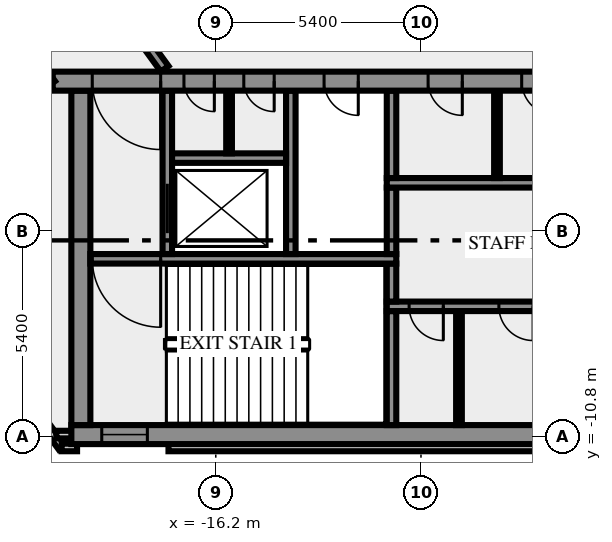
"""IFC4 building model, lengths in metres.
Left out: names, types, materials, properties, quantities, classifications, styles, units other than length and angle.
Written with IfcOpenShell. Run it as: python <this file> out.ifc"""

import sys

from ifc_helpers import new_model, si_unit, direction, frame, frame_2d, origin, place, context, subcontext, project, spatial, rectangle, extrude, element, fill, save


model = new_model("IFC4")
c1 = context("Model", 3, precision=1e-05, world=origin(), true_north=direction((0.0, 1.0)))
c2 = subcontext(c1, "Body", "Model", "MODEL_VIEW")
j1 = project(units=[si_unit("LENGTHUNIT", "METRE"), si_unit("PLANEANGLEUNIT", "RADIAN")], contexts=[c1])
p1 = place(None, origin())
s1 = spatial("IfcSite", under=j1, at=p1, CompositionType="ELEMENT")
p2 = place(p1, origin())
s2 = spatial("IfcBuilding", under=s1, at=p2, CompositionType="ELEMENT")
p3 = place(p2, frame((0.0, 0.0, 222.0)))
s3 = spatial("IfcBuildingStorey", under=s2, at=p3, CompositionType="ELEMENT", Elevation=222.0)
p4 = place(p3, frame((-21.833, -8.909, 0.0), z_axis=(0.0, 0.0, 1.0), x_axis=(0.587766567315, -0.809030569476, 0.0)))
e1 = element("IfcWall", 1, at=p4, inside=s3, PredefinedType="SOLIDWALL", context=c2, shape_type="SweptSolid", body=[
    extrude(rectangle(XDim=2.688, YDim=0.2, at=frame_2d((1.344, 0.0))), origin(), (0.0, 0.0, 1.0), 3.65),
])
p5 = place(p3, frame((-20.256, -11.088, 0.0), z_axis=(0.0, 0.0, 1.0), x_axis=(1.0, 0.0, 0.0)))
e2 = element("IfcWall", 2, at=p5, inside=s3, PredefinedType="SOLIDWALL", context=c2, shape_type="SweptSolid", body=[
    extrude(rectangle(XDim=0.406, YDim=0.2, at=frame_2d((0.203, 0.0))), origin(), (0.0, 0.0, 1.0), 3.65),
])
p6 = place(p3, frame((-17.444, -11.088, 0.0), z_axis=(0.0, 0.0, 1.0), x_axis=(1.0, 0.0, 0.0)))
e3 = element("IfcWall", 3, at=p6, inside=s3, PredefinedType="SOLIDWALL", context=c2, shape_type="SweptSolid", body=[
    extrude(rectangle(XDim=34.888, YDim=0.2, at=frame_2d((17.444, 0.0))), origin(), (0.0, 0.0, 1.0), 3.65),
])
p7 = place(p3, frame((-19.98, -10.75, 0.0), z_axis=(0.0, 0.0, 1.0), x_axis=(-1.0, 0.0, 0.0)))
e4 = element("IfcWall", 4, at=p7, inside=s3, PredefinedType="SOLIDWALL", context=c2, shape_type="SweptSolid", body=[
    extrude(rectangle(XDim=0.417, YDim=0.2, at=frame_2d((0.208, 0.0))), origin(), (0.0, 0.0, 1.0), 3.65),
])
p8 = place(p3, frame((-20.0, -10.75, 0.0), z_axis=(0.0, 0.0, 1.0), x_axis=(1.0, 0.0, 0.0)))
e5 = element("IfcWall", 5, at=p8, inside=s3, PredefinedType="SHEAR", context=c2, shape_type="SweptSolid", body=[
    extrude(rectangle(XDim=40.0, YDim=0.5, at=frame_2d((20.0, 0.0))), origin(), (0.0, 0.0, 1.0), 3.65),
])
p9 = place(p8, frame((0.8, 0.0, 1.0)))
e6 = element("IfcOpeningElement", 6, at=p9, cuts=e5, PredefinedType="OPENING", context=c2, shape_type="SweptSolid", body=[
    extrude(rectangle(XDim=1.2, YDim=1.2, at=frame_2d((0.6, 0.6))), frame((0.0, 0.26, 0.0), z_axis=(0.0, -1.0, 0.0), x_axis=(1.0, 0.0, 0.0)), (0.0, 0.0, 1.0), 0.52),
])
p10 = place(p8, frame((38.0, 0.0, 1.0)))
e7 = element("IfcOpeningElement", 7, at=p10, cuts=e5, PredefinedType="OPENING", context=c2, shape_type="SweptSolid", body=[
    extrude(rectangle(XDim=1.2, YDim=1.2, at=frame_2d((0.6, 0.6))), frame((0.0, 0.26, 0.0), z_axis=(0.0, -1.0, 0.0), x_axis=(1.0, 0.0, 0.0)), (0.0, 0.0, 1.0), 0.52),
])
p11 = place(p3, frame((-19.75, -10.5, 0.0), z_axis=(0.0, 0.0, 1.0), x_axis=(0.0, 1.0, 0.0)))
e8 = element("IfcWall", 8, at=p11, inside=s3, PredefinedType="SHEAR", context=c2, shape_type="SweptSolid", body=[
    extrude(rectangle(XDim=8.8, YDim=0.5, at=frame_2d((4.4, 0.0))), origin(), (0.0, 0.0, 1.0), 3.65),
])
p12 = place(p3, frame((-11.575, -10.5, 0.0), z_axis=(0.0, 0.0, 1.0), x_axis=(0.0, 1.0, 0.0)))
e9 = element("IfcWall", 9, at=p12, inside=s3, PredefinedType="SHEAR", context=c2, shape_type="SweptSolid", body=[
    extrude(rectangle(XDim=3.0, YDim=0.25, at=frame_2d((1.5, 0.0))), origin(), (0.0, 0.0, 1.0), 3.65),
])
p13 = place(p3, frame((-9.8, -10.5, 0.0), z_axis=(0.0, 0.0, 1.0), x_axis=(0.0, 1.0, 0.0)))
e10 = element("IfcWall", 10, at=p13, inside=s3, PredefinedType="PARTITIONING", context=c2, shape_type="SweptSolid", body=[
    extrude(rectangle(XDim=3.0, YDim=0.15, at=frame_2d((1.5, 0.0))), origin(), (0.0, 0.0, 1.0), 3.65),
])
p14 = place(p3, frame((11.7, -7.375, 0.0), z_axis=(0.0, 0.0, 1.0), x_axis=(-1.0, 0.0, 0.0)))
e11 = element("IfcWall", 11, at=p14, inside=s3, PredefinedType="SHEAR", context=c2, shape_type="SweptSolid", body=[
    extrude(rectangle(XDim=23.4, YDim=0.25, at=frame_2d((11.7, 0.0))), origin(), (0.0, 0.0, 1.0), 3.65),
])
p15 = place(p14, frame((21.912, 0.0, 0.0)))
e12 = element("IfcOpeningElement", 12, at=p15, cuts=e11, PredefinedType="OPENING", context=c2, shape_type="SweptSolid", body=[
    extrude(rectangle(XDim=0.9, YDim=2.1, at=frame_2d((0.45, 1.05))), frame((0.0, 0.135, 0.0), z_axis=(0.0, -1.0, 0.0), x_axis=(1.0, 0.0, 0.0)), (0.0, 0.0, 1.0), 0.27),
])
p16 = place(p14, frame((19.55, 0.0, 0.0)))
e13 = element("IfcOpeningElement", 13, at=p16, cuts=e11, PredefinedType="OPENING", context=c2, shape_type="SweptSolid", body=[
    extrude(rectangle(XDim=0.9, YDim=2.1, at=frame_2d((0.45, 1.05))), frame((0.0, 0.135, 0.0), z_axis=(0.0, -1.0, 0.0), x_axis=(1.0, 0.0, 0.0)), (0.0, 0.0, 1.0), 0.27),
])
p17 = place(p14, frame((16.688, 0.0, 0.0)))
e14 = element("IfcOpeningElement", 14, at=p17, cuts=e11, PredefinedType="OPENING", context=c2, shape_type="SweptSolid", body=[
    extrude(rectangle(XDim=0.9, YDim=2.1, at=frame_2d((0.45, 1.05))), frame((0.0, 0.135, 0.0), z_axis=(0.0, -1.0, 0.0), x_axis=(1.0, 0.0, 0.0)), (0.0, 0.0, 1.0), 0.27),
])
p18 = place(p14, frame((14.4, 0.0, 0.0)))
e15 = element("IfcOpeningElement", 15, at=p18, cuts=e11, PredefinedType="OPENING", context=c2, shape_type="SweptSolid", body=[
    extrude(rectangle(XDim=0.9, YDim=2.1, at=frame_2d((0.45, 1.05))), frame((0.0, 0.135, 0.0), z_axis=(0.0, -1.0, 0.0), x_axis=(1.0, 0.0, 0.0)), (0.0, 0.0, 1.0), 0.27),
])
p19 = place(p14, frame((12.5, 0.0, 0.0)))
e16 = element("IfcOpeningElement", 16, at=p19, cuts=e11, PredefinedType="OPENING", context=c2, shape_type="SweptSolid", body=[
    extrude(rectangle(XDim=0.9, YDim=2.1, at=frame_2d((0.45, 1.05))), frame((0.0, 0.135, 0.0), z_axis=(0.0, -1.0, 0.0), x_axis=(1.0, 0.0, 0.0)), (0.0, 0.0, 1.0), 0.27),
])
p20 = place(p14, frame((10.6, 0.0, 0.0)))
e17 = element("IfcOpeningElement", 17, at=p20, cuts=e11, PredefinedType="OPENING", context=c2, shape_type="SweptSolid", body=[
    extrude(rectangle(XDim=0.9, YDim=2.1, at=frame_2d((0.45, 1.05))), frame((0.0, 0.135, 0.0), z_axis=(0.0, -1.0, 0.0), x_axis=(1.0, 0.0, 0.0)), (0.0, 0.0, 1.0), 0.27),
])
p21 = place(p14, frame((8.35, 0.0, 0.0)))
e18 = element("IfcOpeningElement", 18, at=p21, cuts=e11, PredefinedType="OPENING", context=c2, shape_type="SweptSolid", body=[
    extrude(rectangle(XDim=1.1, YDim=2.1, at=frame_2d((0.55, 1.05))), frame((0.0, 0.135, 0.0), z_axis=(0.0, -1.0, 0.0), x_axis=(1.0, 0.0, 0.0)), (0.0, 0.0, 1.0), 0.27),
])
p22 = place(p14, frame((5.85, 0.0, 0.0)))
e19 = element("IfcOpeningElement", 19, at=p22, cuts=e11, PredefinedType="OPENING", context=c2, shape_type="SweptSolid", body=[
    extrude(rectangle(XDim=1.1, YDim=2.1, at=frame_2d((0.55, 1.05))), frame((0.0, 0.135, 0.0), z_axis=(0.0, -1.0, 0.0), x_axis=(1.0, 0.0, 0.0)), (0.0, 0.0, 1.0), 0.27),
])
p23 = place(p14, frame((3.35, 0.0, 0.0)))
e20 = element("IfcOpeningElement", 20, at=p23, cuts=e11, PredefinedType="OPENING", context=c2, shape_type="SweptSolid", body=[
    extrude(rectangle(XDim=1.1, YDim=2.1, at=frame_2d((0.55, 1.05))), frame((0.0, 0.135, 0.0), z_axis=(0.0, -1.0, 0.0), x_axis=(1.0, 0.0, 0.0)), (0.0, 0.0, 1.0), 0.27),
])
p24 = place(p14, frame((0.85, 0.0, 0.0)))
e21 = element("IfcOpeningElement", 21, at=p24, cuts=e11, PredefinedType="OPENING", context=c2, shape_type="SweptSolid", body=[
    extrude(rectangle(XDim=1.1, YDim=2.1, at=frame_2d((0.55, 1.05))), frame((0.0, 0.135, 0.0), z_axis=(0.0, -1.0, 0.0), x_axis=(1.0, 0.0, 0.0)), (0.0, 0.0, 1.0), 0.27),
])
p25 = place(p3, frame((-11.575, -7.25, 0.0), z_axis=(0.0, 0.0, 1.0), x_axis=(0.0, 1.0, 0.0)))
e22 = element("IfcWall", 22, at=p25, inside=s3, PredefinedType="SHEAR", context=c2, shape_type="SweptSolid", body=[
    extrude(rectangle(XDim=1.0, YDim=0.25, at=frame_2d((0.5, 0.0))), origin(), (0.0, 0.0, 1.0), 3.65),
])
p26 = place(p3, frame((-11.45, -6.125, 0.0), z_axis=(0.0, 0.0, 1.0), x_axis=(-1.0, 0.0, 0.0)))
e23 = element("IfcWall", 23, at=p26, inside=s3, PredefinedType="SHEAR", context=c2, shape_type="SweptSolid", body=[
    extrude(rectangle(XDim=8.05, YDim=0.25, at=frame_2d((4.025, 0.0))), origin(), (0.0, 0.0, 1.0), 3.65),
])
p27 = place(p26, frame((6.2, 0.0, 0.0)))
e24 = element("IfcOpeningElement", 24, at=p27, cuts=e23, PredefinedType="OPENING", context=c2, shape_type="SweptSolid", body=[
    extrude(rectangle(XDim=1.8, YDim=2.1, at=frame_2d((0.9, 1.05))), frame((0.0, 0.135, 0.0), z_axis=(0.0, -1.0, 0.0), x_axis=(1.0, 0.0, 0.0)), (0.0, 0.0, 1.0), 0.27),
])
p28 = place(p3, frame((-17.475, -6.0, 0.0), z_axis=(0.0, 0.0, 1.0), x_axis=(0.0, 1.0, 0.0)))
e25 = element("IfcWall", 25, at=p28, inside=s3, PredefinedType="SHEAR", context=c2, shape_type="SweptSolid", body=[
    extrude(rectangle(XDim=4.3, YDim=0.25, at=frame_2d((2.15, 0.0))), origin(), (0.0, 0.0, 1.0), 3.65),
])
p29 = place(p28, frame((0.55, 0.0, 0.0)))
e26 = element("IfcOpeningElement", 26, at=p29, cuts=e25, PredefinedType="OPENING", context=c2, shape_type="SweptSolid", body=[
    extrude(rectangle(XDim=1.3, YDim=2.1, at=frame_2d((0.65, 1.05))), frame((0.0, 0.135, 0.0), z_axis=(0.0, -1.0, 0.0), x_axis=(1.0, 0.0, 0.0)), (0.0, 0.0, 1.0), 0.27),
])
p30 = place(p3, frame((-14.225, -6.0, 0.0), z_axis=(0.0, 0.0, 1.0), x_axis=(0.0, 1.0, 0.0)))
e27 = element("IfcWall", 27, at=p30, inside=s3, PredefinedType="SHEAR", context=c2, shape_type="SweptSolid", body=[
    extrude(rectangle(XDim=4.3, YDim=0.25, at=frame_2d((2.15, 0.0))), origin(), (0.0, 0.0, 1.0), 3.65),
])
p31 = place(p3, frame((-11.575, -6.0, 0.0), z_axis=(0.0, 0.0, 1.0), x_axis=(0.0, 1.0, 0.0)))
e28 = element("IfcWall", 28, at=p31, inside=s3, PredefinedType="SHEAR", context=c2, shape_type="SweptSolid", body=[
    extrude(rectangle(XDim=1.75, YDim=0.25, at=frame_2d((0.875, 0.0))), origin(), (0.0, 0.0, 1.0), 3.65),
])
p32 = place(p3, frame((-11.7, -4.125, 0.0), z_axis=(0.0, 0.0, 1.0), x_axis=(1.0, 0.0, 0.0)))
e29 = element("IfcWall", 29, at=p32, inside=s3, PredefinedType="SHEAR", context=c2, shape_type="SweptSolid", body=[
    extrude(rectangle(XDim=7.75, YDim=0.25, at=frame_2d((3.875, 0.0))), origin(), (0.0, 0.0, 1.0), 3.65),
])
p33 = place(p3, frame((-11.575, -4.0, 0.0), z_axis=(0.0, 0.0, 1.0), x_axis=(0.0, 1.0, 0.0)))
e30 = element("IfcWall", 30, at=p33, inside=s3, PredefinedType="SHEAR", context=c2, shape_type="SweptSolid", body=[
    extrude(rectangle(XDim=2.3, YDim=0.25, at=frame_2d((1.15, 0.0))), origin(), (0.0, 0.0, 1.0), 3.65),
])
p34 = place(p3, frame((-8.8, -4.0, 0.0), z_axis=(0.0, 0.0, 1.0), x_axis=(0.0, 1.0, 0.0)))
e31 = element("IfcWall", 31, at=p34, inside=s3, PredefinedType="PARTITIONING", context=c2, shape_type="SweptSolid", body=[
    extrude(rectangle(XDim=2.3, YDim=0.15, at=frame_2d((1.15, 0.0))), origin(), (0.0, 0.0, 1.0), 3.65),
])
p35 = place(p3, frame((-17.35, -3.475, 0.0), z_axis=(0.0, 0.0, 1.0), x_axis=(1.0, 0.0, 0.0)))
e32 = element("IfcWall", 32, at=p35, inside=s3, PredefinedType="SHEAR", context=c2, shape_type="SweptSolid", body=[
    extrude(rectangle(XDim=3.0, YDim=0.25, at=frame_2d((1.5, 0.0))), origin(), (0.0, 0.0, 1.0), 3.65),
])
p36 = place(p3, frame((-15.85, -3.35, 0.0), z_axis=(0.0, 0.0, 1.0), x_axis=(0.0, 1.0, 0.0)))
e33 = element("IfcWall", 33, at=p36, inside=s3, PredefinedType="PARTITIONING", context=c2, shape_type="SweptSolid", body=[
    extrude(rectangle(XDim=1.65, YDim=0.15, at=frame_2d((0.825, 0.0))), origin(), (0.0, 0.0, 1.0), 3.65),
])
p37 = place(p3, frame((20.49, -1.45, 0.0), z_axis=(0.0, 0.0, 1.0), x_axis=(-1.0, 0.0, 0.0)))
e34 = element("IfcWall", 34, at=p37, inside=s3, PredefinedType="SHEAR", context=c2, shape_type="SweptSolid", body=[
    extrude(rectangle(XDim=40.98, YDim=0.5, at=frame_2d((20.49, 0.0))), origin(), (0.0, 0.0, 1.0), 3.65),
])
p38 = place(p37, frame((38.14, 0.0, 0.0)))
e35 = element("IfcOpeningElement", 35, at=p38, cuts=e34, PredefinedType="OPENING", context=c2, shape_type="SweptSolid", body=[
    extrude(rectangle(XDim=1.8, YDim=2.1, at=frame_2d((0.9, 1.05))), frame((0.0, 0.26, 0.0), z_axis=(0.0, -1.0, 0.0), x_axis=(1.0, 0.0, 0.0)), (0.0, 0.0, 1.0), 0.52),
])
p39 = place(p37, frame((36.728, 0.0, 0.0)))
e36 = element("IfcOpeningElement", 36, at=p39, cuts=e34, PredefinedType="OPENING", context=c2, shape_type="SweptSolid", body=[
    extrude(rectangle(XDim=0.8, YDim=2.1, at=frame_2d((0.4, 1.05))), frame((0.0, 0.26, 0.0), z_axis=(0.0, -1.0, 0.0), x_axis=(1.0, 0.0, 0.0)), (0.0, 0.0, 1.0), 0.52),
])
p40 = place(p37, frame((35.153, 0.0, 0.0)))
e37 = element("IfcOpeningElement", 37, at=p40, cuts=e34, PredefinedType="OPENING", context=c2, shape_type="SweptSolid", body=[
    extrude(rectangle(XDim=0.8, YDim=2.1, at=frame_2d((0.4, 1.05))), frame((0.0, 0.26, 0.0), z_axis=(0.0, -1.0, 0.0), x_axis=(1.0, 0.0, 0.0)), (0.0, 0.0, 1.0), 0.52),
])
p41 = place(p37, frame((32.94, 0.0, 0.0)))
e38 = element("IfcOpeningElement", 38, at=p41, cuts=e34, PredefinedType="OPENING", context=c2, shape_type="SweptSolid", body=[
    extrude(rectangle(XDim=0.9, YDim=2.1, at=frame_2d((0.45, 1.05))), frame((0.0, 0.26, 0.0), z_axis=(0.0, -1.0, 0.0), x_axis=(1.0, 0.0, 0.0)), (0.0, 0.0, 1.0), 0.52),
])
p42 = place(p37, frame((30.202, 0.0, 0.0)))
e39 = element("IfcOpeningElement", 39, at=p42, cuts=e34, PredefinedType="OPENING", context=c2, shape_type="SweptSolid", body=[
    extrude(rectangle(XDim=0.9, YDim=2.1, at=frame_2d((0.45, 1.05))), frame((0.0, 0.26, 0.0), z_axis=(0.0, -1.0, 0.0), x_axis=(1.0, 0.0, 0.0)), (0.0, 0.0, 1.0), 0.52),
])
p43 = place(p37, frame((27.74, 0.0, 0.0)))
e40 = element("IfcOpeningElement", 40, at=p43, cuts=e34, PredefinedType="OPENING", context=c2, shape_type="SweptSolid", body=[
    extrude(rectangle(XDim=0.9, YDim=2.1, at=frame_2d((0.45, 1.05))), frame((0.0, 0.26, 0.0), z_axis=(0.0, -1.0, 0.0), x_axis=(1.0, 0.0, 0.0)), (0.0, 0.0, 1.0), 0.52),
])
p44 = place(p37, frame((25.377, 0.0, 0.0)))
e41 = element("IfcOpeningElement", 41, at=p44, cuts=e34, PredefinedType="OPENING", context=c2, shape_type="SweptSolid", body=[
    extrude(rectangle(XDim=0.9, YDim=2.1, at=frame_2d((0.45, 1.05))), frame((0.0, 0.26, 0.0), z_axis=(0.0, -1.0, 0.0), x_axis=(1.0, 0.0, 0.0)), (0.0, 0.0, 1.0), 0.52),
])
p45 = place(p37, frame((20.74, 0.0, 0.0)))
e42 = element("IfcOpeningElement", 42, at=p45, cuts=e34, PredefinedType="OPENING", context=c2, shape_type="SweptSolid", body=[
    extrude(rectangle(XDim=2.0, YDim=2.1, at=frame_2d((1.0, 1.05))), frame((0.0, 0.26, 0.0), z_axis=(0.0, -1.0, 0.0), x_axis=(1.0, 0.0, 0.0)), (0.0, 0.0, 1.0), 0.52),
])
p46 = place(p37, frame((7.14, 0.0, 0.0)))
e43 = element("IfcOpeningElement", 43, at=p46, cuts=e34, PredefinedType="OPENING", context=c2, shape_type="SweptSolid", body=[
    extrude(rectangle(XDim=0.9, YDim=2.1, at=frame_2d((0.45, 1.05))), frame((0.0, 0.26, 0.0), z_axis=(0.0, -1.0, 0.0), x_axis=(1.0, 0.0, 0.0)), (0.0, 0.0, 1.0), 0.52),
])
p47 = place(p37, frame((4.19, 0.0, 0.0)))
e44 = element("IfcOpeningElement", 44, at=p47, cuts=e34, PredefinedType="OPENING", context=c2, shape_type="SweptSolid", body=[
    extrude(rectangle(XDim=0.9, YDim=2.1, at=frame_2d((0.45, 1.05))), frame((0.0, 0.26, 0.0), z_axis=(0.0, -1.0, 0.0), x_axis=(1.0, 0.0, 0.0)), (0.0, 0.0, 1.0), 0.52),
])
p48 = place(p37, frame((1.04, 0.0, 0.0)))
e45 = element("IfcOpeningElement", 45, at=p48, cuts=e34, PredefinedType="OPENING", context=c2, shape_type="SweptSolid", body=[
    extrude(rectangle(XDim=1.8, YDim=2.1, at=frame_2d((0.9, 1.05))), frame((0.0, 0.26, 0.0), z_axis=(0.0, -1.0, 0.0), x_axis=(1.0, 0.0, 0.0)), (0.0, 0.0, 1.0), 0.52),
])
p49 = place(p3, frame((-20.531, -1.523, 0.0), z_axis=(0.0, 0.0, 1.0), x_axis=(-0.587784239999, 0.809017729849, 0.0)))
e46 = element("IfcWall", 46, at=p49, inside=s3, PredefinedType="SOLIDWALL", context=c2, shape_type="SweptSolid", body=[
    extrude(rectangle(XDim=23.271, YDim=0.25, at=frame_2d((11.635, 0.0))), origin(), (0.0, 0.0, 1.0), 3.65),
])
p50 = place(p49, frame((0.533, 0.0, 0.0)))
e47 = element("IfcOpeningElement", 47, at=p50, cuts=e46, PredefinedType="OPENING", context=c2, shape_type="SweptSolid", body=[
    extrude(rectangle(XDim=0.9, YDim=2.1, at=frame_2d((0.45, 1.05))), frame((0.0, 0.135, 0.0), z_axis=(0.0, -1.0, 0.0), x_axis=(1.0, 0.0, 0.0)), (0.0, 0.0, 1.0), 0.27),
])
p51 = place(p49, frame((17.106, 0.0, 0.0)))
e48 = element("IfcOpeningElement", 48, at=p51, cuts=e46, PredefinedType="OPENING", context=c2, shape_type="SweptSolid", body=[
    extrude(rectangle(XDim=1.8, YDim=2.1, at=frame_2d((0.9, 1.05))), frame((0.0, 0.135, 0.0), z_axis=(0.0, -1.0, 0.0), x_axis=(1.0, 0.0, 0.0)), (0.0, 0.0, 1.0), 0.27),
])
p52 = place(p49, frame((10.516, 0.0, 0.0)))
e49 = element("IfcOpeningElement", 49, at=p52, cuts=e46, PredefinedType="OPENING", context=c2, shape_type="SweptSolid", body=[
    extrude(rectangle(XDim=0.9, YDim=2.1, at=frame_2d((0.45, 1.05))), frame((0.0, 0.135, 0.0), z_axis=(0.0, -1.0, 0.0), x_axis=(1.0, 0.0, 0.0)), (0.0, 0.0, 1.0), 0.27),
])
p53 = place(p3, frame((-31.918, 18.658, 0.0), z_axis=(0.0, 0.0, 1.0), x_axis=(0.587788731405, -0.80901446664, 0.0)))
e50 = element("IfcWall", 50, at=p53, inside=s3, PredefinedType="SOLIDWALL", context=c2, shape_type="SweptSolid", body=[
    extrude(rectangle(XDim=24.453, YDim=0.25, at=frame_2d((12.227, 0.0))), origin(), (0.0, 0.0, 1.0), 3.65),
])
p54 = place(p53, frame((8.395, 0.0, 0.0)))
e51 = element("IfcOpeningElement", 51, at=p54, cuts=e50, PredefinedType="OPENING", context=c2, shape_type="SweptSolid", body=[
    extrude(rectangle(XDim=1.0, YDim=2.1, at=frame_2d((0.5, 1.05))), frame((0.0, 0.135, 0.0), z_axis=(0.0, -1.0, 0.0), x_axis=(1.0, 0.0, 0.0)), (0.0, 0.0, 1.0), 0.27),
])
p55 = place(p53, frame((10.095, 0.0, 0.0)))
e52 = element("IfcOpeningElement", 52, at=p55, cuts=e50, PredefinedType="OPENING", context=c2, shape_type="SweptSolid", body=[
    extrude(rectangle(XDim=0.9, YDim=2.1, at=frame_2d((0.45, 1.05))), frame((0.0, 0.135, 0.0), z_axis=(0.0, -1.0, 0.0), x_axis=(1.0, 0.0, 0.0)), (0.0, 0.0, 1.0), 0.27),
])
p56 = place(p9, origin())
e53 = element("IfcWindow", 53, at=p56, inside=s3, PartitioningType="SINGLE_PANEL", PredefinedType="WINDOW", context=c2, shape_type="SweptSolid", body=[
    extrude(rectangle(XDim=1.2, YDim=1.2, at=frame_2d((0.6, 0.6))), frame((0.0, 0.03, 0.0), z_axis=(0.0, -1.0, 0.0), x_axis=(1.0, 0.0, 0.0)), (0.0, 0.0, 1.0), 0.06),
])
fill(e6, e53)
p57 = place(p15, origin())
e54 = element("IfcDoor", 54, at=p57, inside=s3, OperationType="SINGLE_SWING_RIGHT", PredefinedType="DOOR", context=c2, shape_type="SweptSolid", body=[
    extrude(rectangle(XDim=0.9, YDim=2.1, at=frame_2d((0.45, 1.05))), frame((0.0, 0.025, 0.0), z_axis=(0.0, -1.0, 0.0), x_axis=(1.0, 0.0, 0.0)), (0.0, 0.0, 1.0), 0.05),
])
fill(e12, e54)
p58 = place(p16, origin())
e55 = element("IfcDoor", 55, at=p58, inside=s3, OperationType="SINGLE_SWING_RIGHT", PredefinedType="DOOR", context=c2, shape_type="SweptSolid", body=[
    extrude(rectangle(XDim=0.9, YDim=2.1, at=frame_2d((0.45, 1.05))), frame((0.0, 0.025, 0.0), z_axis=(0.0, -1.0, 0.0), x_axis=(1.0, 0.0, 0.0)), (0.0, 0.0, 1.0), 0.05),
])
fill(e13, e55)
p59 = place(p27, origin())
e56 = element("IfcDoor", 56, at=p59, inside=s3, OperationType="DOUBLE_DOOR_SINGLE_SWING", PredefinedType="DOOR", context=c2, shape_type="SweptSolid", body=[
    extrude(rectangle(XDim=1.8, YDim=2.1, at=frame_2d((0.9, 1.05))), frame((0.0, 0.025, 0.0), z_axis=(0.0, -1.0, 0.0), x_axis=(1.0, 0.0, 0.0)), (0.0, 0.0, 1.0), 0.05),
])
fill(e24, e56)
p60 = place(p29, origin())
e57 = element("IfcDoor", 57, at=p60, inside=s3, OperationType="DOUBLE_DOOR_SLIDING", PredefinedType="DOOR", context=c2, shape_type="SweptSolid", body=[
    extrude(rectangle(XDim=1.3, YDim=2.1, at=frame_2d((0.65, 1.05))), frame((0.0, 0.025, 0.0), z_axis=(0.0, -1.0, 0.0), x_axis=(1.0, 0.0, 0.0)), (0.0, 0.0, 1.0), 0.05),
])
fill(e26, e57)
p61 = place(p38, origin())
e58 = element("IfcDoor", 58, at=p61, inside=s3, OperationType="DOUBLE_DOOR_SINGLE_SWING", PredefinedType="DOOR", context=c2, shape_type="SweptSolid", body=[
    extrude(rectangle(XDim=1.8, YDim=2.1, at=frame_2d((0.9, 1.05))), frame((0.0, 0.025, 0.0), z_axis=(0.0, -1.0, 0.0), x_axis=(1.0, 0.0, 0.0)), (0.0, 0.0, 1.0), 0.05),
])
fill(e35, e58)
p62 = place(p39, origin())
e59 = element("IfcDoor", 59, at=p62, inside=s3, OperationType="SINGLE_SWING_RIGHT", PredefinedType="DOOR", context=c2, shape_type="SweptSolid", body=[
    extrude(rectangle(XDim=0.8, YDim=2.1, at=frame_2d((0.4, 1.05))), frame((0.0, 0.025, 0.0), z_axis=(0.0, -1.0, 0.0), x_axis=(1.0, 0.0, 0.0)), (0.0, 0.0, 1.0), 0.05),
])
fill(e36, e59)
p63 = place(p40, origin())
e60 = element("IfcDoor", 60, at=p63, inside=s3, OperationType="SINGLE_SWING_RIGHT", PredefinedType="DOOR", context=c2, shape_type="SweptSolid", body=[
    extrude(rectangle(XDim=0.8, YDim=2.1, at=frame_2d((0.4, 1.05))), frame((0.0, 0.025, 0.0), z_axis=(0.0, -1.0, 0.0), x_axis=(1.0, 0.0, 0.0)), (0.0, 0.0, 1.0), 0.05),
])
fill(e37, e60)
p64 = place(p41, origin())
e61 = element("IfcDoor", 61, at=p64, inside=s3, OperationType="SINGLE_SWING_RIGHT", PredefinedType="DOOR", context=c2, shape_type="SweptSolid", body=[
    extrude(rectangle(XDim=0.9, YDim=2.1, at=frame_2d((0.45, 1.05))), frame((0.0, 0.025, 0.0), z_axis=(0.0, -1.0, 0.0), x_axis=(1.0, 0.0, 0.0)), (0.0, 0.0, 1.0), 0.05),
])
fill(e38, e61)
p65 = place(p42, origin())
e62 = element("IfcDoor", 62, at=p65, inside=s3, OperationType="SINGLE_SWING_RIGHT", PredefinedType="DOOR", context=c2, shape_type="SweptSolid", body=[
    extrude(rectangle(XDim=0.9, YDim=2.1, at=frame_2d((0.45, 1.05))), frame((0.0, 0.025, 0.0), z_axis=(0.0, -1.0, 0.0), x_axis=(1.0, 0.0, 0.0)), (0.0, 0.0, 1.0), 0.05),
])
fill(e39, e62)
p66 = place(p43, origin())
e63 = element("IfcDoor", 63, at=p66, inside=s3, OperationType="SINGLE_SWING_RIGHT", PredefinedType="DOOR", context=c2, shape_type="SweptSolid", body=[
    extrude(rectangle(XDim=0.9, YDim=2.1, at=frame_2d((0.45, 1.05))), frame((0.0, 0.025, 0.0), z_axis=(0.0, -1.0, 0.0), x_axis=(1.0, 0.0, 0.0)), (0.0, 0.0, 1.0), 0.05),
])
fill(e40, e63)
save(model, sys.argv[1])
